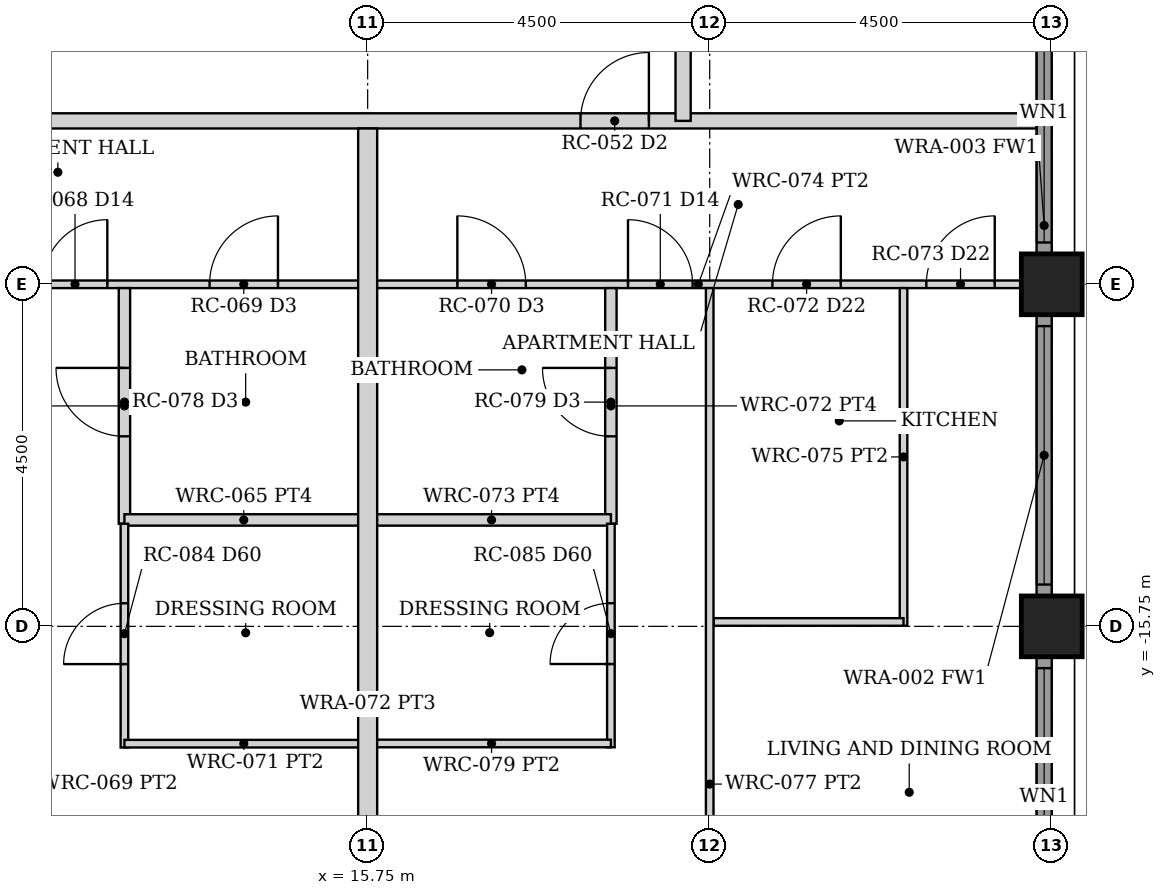
"""IFC4 building model, lengths in metres.
Left out: names, types, materials, properties, quantities, classifications, styles, units other than length and angle.
Written with IfcOpenShell. Run it as: python <this file> out.ifc"""

import sys

from ifc_helpers import new_model, si_unit, direction, frame, frame_2d, origin, origin_2d, place, context, subcontext, project, spatial, rectangle, hollow_rectangle, extrude, element, fill, save


model = new_model("IFC4")
c1 = context("Model", 3, precision=1e-05, world=origin(), true_north=direction((0.0, 1.0)))
c2 = subcontext(c1, "Body", "Model", "MODEL_VIEW")
j1 = project(units=[si_unit("LENGTHUNIT", "METRE"), si_unit("PLANEANGLEUNIT", "RADIAN")], contexts=[c1])
p1 = place(None, origin())
s1 = spatial("IfcSite", under=j1, at=p1, CompositionType="ELEMENT")
p2 = place(p1, origin())
s2 = spatial("IfcBuilding", under=s1, at=p2, CompositionType="ELEMENT")
p3 = place(p2, frame((0.0, 0.0, 47.5)))
s3 = spatial("IfcBuildingStorey", under=s2, at=p3, CompositionType="ELEMENT", Elevation=47.5)
for number, where, z_axis, x_axis in (
    (1, (24.75, -15.75, 0.0), (0.0, 0.0, 1.0), (1.0, 0.0, 0.0)),
    (2, (24.75, -11.25, 0.0), (0.0, 0.0, 1.0), (1.0, 0.0, 0.0)),
):
    element("IfcColumn", number, at=place(p3, frame(where, z_axis=z_axis, x_axis=x_axis)), inside=s3, PredefinedType="COLUMN", context=c2, shape_type="SweptSolid", body=[
        extrude(hollow_rectangle(XDim=0.8, YDim=0.8, WallThickness=0.07, at=origin_2d()), origin(), (0.0, 0.0, 1.0), 3.5),
    ])
p4 = place(p3, frame((24.65, -19.845, 0.0), z_axis=(0.0, 0.0, 1.0), x_axis=(0.0, 1.0, 0.0)))
e3 = element("IfcWall", 3, at=p4, inside=s3, PredefinedType="SOLIDWALL", context=c2, shape_type="SweptSolid", body=[
    extrude(rectangle(XDim=3.69, YDim=0.2, at=frame_2d((1.845, 0.0))), origin(), (0.0, 0.0, 1.0), 2.379),
])
p5 = place(p4, frame((0.145, 0.0, 0.3)))
e4 = element("IfcOpeningElement", 4, at=p5, cuts=e3, PredefinedType="OPENING", context=c2, shape_type="SweptSolid", body=[
    extrude(rectangle(XDim=3.4, YDim=1.929, at=frame_2d((1.7, 0.964))), frame((0.0, 0.11, 0.0), z_axis=(0.0, -1.0, 0.0), x_axis=(1.0, 0.0, 0.0)), (0.0, 0.0, 1.0), 0.22),
])
p6 = place(p3, frame((24.65, -15.345, 0.0), z_axis=(0.0, 0.0, 1.0), x_axis=(0.0, 1.0, 0.0)))
e5 = element("IfcWall", 5, at=p6, inside=s3, PredefinedType="SOLIDWALL", context=c2, shape_type="SweptSolid", body=[
    extrude(rectangle(XDim=3.69, YDim=0.2, at=frame_2d((1.845, 0.0))), origin(), (0.0, 0.0, 1.0), 2.379),
])
p7 = place(p6, frame((0.145, 0.0, 0.3)))
e6 = element("IfcOpeningElement", 6, at=p7, cuts=e5, PredefinedType="OPENING", context=c2, shape_type="SweptSolid", body=[
    extrude(rectangle(XDim=3.4, YDim=1.929, at=frame_2d((1.7, 0.964))), frame((0.0, 0.11, 0.0), z_axis=(0.0, -1.0, 0.0), x_axis=(1.0, 0.0, 0.0)), (0.0, 0.0, 1.0), 0.22),
])
p8 = place(p3, frame((24.65, -10.845, 0.0), z_axis=(0.0, 0.0, 1.0), x_axis=(0.0, 1.0, 0.0)))
e7 = element("IfcWall", 7, at=p8, inside=s3, PredefinedType="SOLIDWALL", context=c2, shape_type="SweptSolid", body=[
    extrude(rectangle(XDim=3.69, YDim=0.2, at=frame_2d((1.845, 0.0))), origin(), (0.0, 0.0, 1.0), 2.379),
])
p9 = place(p8, frame((0.145, 0.0, 0.3)))
e8 = element("IfcOpeningElement", 8, at=p9, cuts=e7, PredefinedType="OPENING", context=c2, shape_type="SweptSolid", body=[
    extrude(rectangle(XDim=3.4, YDim=1.929, at=frame_2d((1.7, 0.964))), frame((0.0, 0.11, 0.0), z_axis=(0.0, -1.0, 0.0), x_axis=(1.0, 0.0, 0.0)), (0.0, 0.0, 1.0), 0.22),
])
p10 = place(p3, frame((-24.55, -9.1, 0.0), z_axis=(0.0, 0.0, 1.0), x_axis=(1.0, 0.0, 0.0)))
e9 = element("IfcWall", 9, at=p10, inside=s3, PredefinedType="PARTITIONING", context=c2, shape_type="SweptSolid", body=[
    extrude(rectangle(XDim=49.1, YDim=0.2, at=frame_2d((24.55, 0.0))), origin(), (0.0, 0.0, 1.0), 2.373),
])
p11 = place(p10, frame((5.1, 0.0, 0.0)))
e10 = element("IfcOpeningElement", 10, at=p11, cuts=e9, PredefinedType="OPENING", context=c2, shape_type="SweptSolid", body=[
    extrude(rectangle(XDim=0.9, YDim=2.1, at=frame_2d((0.45, 1.05))), frame((0.0, 0.11, 0.0), z_axis=(0.0, -1.0, 0.0), x_axis=(1.0, 0.0, 0.0)), (0.0, 0.0, 1.0), 0.22),
])
p12 = place(p10, frame((13.6, 0.0, 0.0)))
e11 = element("IfcOpeningElement", 11, at=p12, cuts=e9, PredefinedType="OPENING", context=c2, shape_type="SweptSolid", body=[
    extrude(rectangle(XDim=0.9, YDim=2.1, at=frame_2d((0.45, 1.05))), frame((0.0, 0.11, 0.0), z_axis=(0.0, -1.0, 0.0), x_axis=(1.0, 0.0, 0.0)), (0.0, 0.0, 1.0), 0.22),
])
p13 = place(p10, frame((18.1, 0.0, 0.0)))
e12 = element("IfcOpeningElement", 12, at=p13, cuts=e9, PredefinedType="OPENING", context=c2, shape_type="SweptSolid", body=[
    extrude(rectangle(XDim=0.9, YDim=2.1, at=frame_2d((0.45, 1.05))), frame((0.0, 0.11, 0.0), z_axis=(0.0, -1.0, 0.0), x_axis=(1.0, 0.0, 0.0)), (0.0, 0.0, 1.0), 0.22),
])
p14 = place(p10, frame((31.6, 0.0, 0.0)))
e13 = element("IfcOpeningElement", 13, at=p14, cuts=e9, PredefinedType="OPENING", context=c2, shape_type="SweptSolid", body=[
    extrude(rectangle(XDim=0.9, YDim=2.1, at=frame_2d((0.45, 1.05))), frame((0.0, 0.11, 0.0), z_axis=(0.0, -1.0, 0.0), x_axis=(1.0, 0.0, 0.0)), (0.0, 0.0, 1.0), 0.22),
])
p15 = place(p10, frame((43.1, 0.0, 0.0)))
e14 = element("IfcOpeningElement", 14, at=p15, cuts=e9, PredefinedType="OPENING", context=c2, shape_type="SweptSolid", body=[
    extrude(rectangle(XDim=0.9, YDim=2.1, at=frame_2d((0.45, 1.05))), frame((0.0, 0.11, 0.0), z_axis=(0.0, -1.0, 0.0), x_axis=(1.0, 0.0, 0.0)), (0.0, 0.0, 1.0), 0.22),
])
p16 = place(p3, frame((19.9, -9.1, 0.0), z_axis=(0.0, 0.0, 1.0), x_axis=(0.0, 1.0, 0.0)))
e15 = element("IfcWall", 15, at=p16, inside=s3, PredefinedType="PARTITIONING", context=c2, shape_type="SweptSolid", body=[
    extrude(rectangle(XDim=18.2, YDim=0.2, at=frame_2d((9.1, 0.0))), origin(), (0.0, 0.0, 1.0), 2.373),
])
p17 = place(p16, frame((8.6, 0.0, 0.0)))
e16 = element("IfcOpeningElement", 16, at=p17, cuts=e15, PredefinedType="OPENING", context=c2, shape_type="SweptSolid", body=[
    extrude(rectangle(XDim=1.0, YDim=2.1, at=frame_2d((0.5, 1.05))), frame((0.0, 0.11, 0.0), z_axis=(0.0, -1.0, 0.0), x_axis=(1.0, 0.0, 0.0)), (0.0, 0.0, 1.0), 0.22),
])
p18 = place(p3, frame((6.85, -11.25, 0.0), z_axis=(0.0, 0.0, 1.0), x_axis=(1.0, 0.0, 0.0)))
e17 = element("IfcWall", 17, at=p18, inside=s3, PredefinedType="PARTITIONING", context=c2, shape_type="SweptSolid", body=[
    extrude(rectangle(XDim=8.8, YDim=0.1, at=frame_2d((4.4, 0.0))), origin(), (0.0, 0.0, 1.0), 2.373),
])
p19 = place(p18, frame((0.85, 0.0, 0.0)))
e18 = element("IfcOpeningElement", 18, at=p19, cuts=e17, PredefinedType="OPENING", context=c2, shape_type="SweptSolid", body=[
    extrude(rectangle(XDim=0.9, YDim=2.1, at=frame_2d((0.45, 1.05))), frame((0.0, 0.06, 0.0), z_axis=(0.0, -1.0, 0.0), x_axis=(1.0, 0.0, 0.0)), (0.0, 0.0, 1.0), 0.12),
])
p20 = place(p18, frame((3.1, 0.0, 0.0)))
e19 = element("IfcOpeningElement", 19, at=p20, cuts=e17, PredefinedType="OPENING", context=c2, shape_type="SweptSolid", body=[
    extrude(rectangle(XDim=0.9, YDim=2.1, at=frame_2d((0.45, 1.05))), frame((0.0, 0.06, 0.0), z_axis=(0.0, -1.0, 0.0), x_axis=(1.0, 0.0, 0.0)), (0.0, 0.0, 1.0), 0.12),
])
p21 = place(p18, frame((4.625, 0.0, 0.0)))
e20 = element("IfcOpeningElement", 20, at=p21, cuts=e17, PredefinedType="OPENING", context=c2, shape_type="SweptSolid", body=[
    extrude(rectangle(XDim=0.85, YDim=2.1, at=frame_2d((0.425, 1.05))), frame((0.0, 0.06, 0.0), z_axis=(0.0, -1.0, 0.0), x_axis=(1.0, 0.0, 0.0)), (0.0, 0.0, 1.0), 0.12),
])
p22 = place(p18, frame((6.82, 0.0, 0.0)))
e21 = element("IfcOpeningElement", 21, at=p22, cuts=e17, PredefinedType="OPENING", context=c2, shape_type="SweptSolid", body=[
    extrude(rectangle(XDim=0.9, YDim=2.1, at=frame_2d((0.45, 1.05))), frame((0.0, 0.06, 0.0), z_axis=(0.0, -1.0, 0.0), x_axis=(1.0, 0.0, 0.0)), (0.0, 0.0, 1.0), 0.12),
])
p23 = place(p3, frame((12.55, -14.4, 0.0), z_axis=(0.0, 0.0, 1.0), x_axis=(0.0, 1.0, 0.0)))
e22 = element("IfcWall", 22, at=p23, inside=s3, PredefinedType="PARTITIONING", context=c2, shape_type="SweptSolid", body=[
    extrude(rectangle(XDim=3.1, YDim=0.15, at=frame_2d((1.55, 0.0))), origin(), (0.0, 0.0, 1.0), 2.373),
])
p24 = place(p23, frame((1.15, 0.0, 0.0)))
e23 = element("IfcOpeningElement", 23, at=p24, cuts=e22, PredefinedType="OPENING", context=c2, shape_type="SweptSolid", body=[
    extrude(rectangle(XDim=0.9, YDim=2.1, at=frame_2d((0.45, 1.05))), frame((0.0, 0.085, 0.0), z_axis=(0.0, -1.0, 0.0), x_axis=(1.0, 0.0, 0.0)), (0.0, 0.0, 1.0), 0.17),
])
p25 = place(p3, frame((12.55, -14.35, 0.0), z_axis=(0.0, 0.0, 1.0), x_axis=(1.0, 0.0, 0.0)))
e24 = element("IfcWall", 24, at=p25, inside=s3, PredefinedType="PARTITIONING", context=c2, shape_type="SweptSolid", body=[
    extrude(rectangle(XDim=3.14, YDim=0.15, at=frame_2d((1.57, 0.0))), origin(), (0.0, 0.0, 1.0), 2.373),
])
p26 = place(p3, frame((12.55, -17.344, 0.0), z_axis=(0.0, 0.0, 1.0), x_axis=(0.0, 1.0, 0.0)))
e25 = element("IfcWall", 25, at=p26, inside=s3, PredefinedType="PARTITIONING", context=c2, shape_type="SweptSolid", body=[
    extrude(rectangle(XDim=2.944, YDim=0.1, at=frame_2d((1.472, 0.0))), origin(), (0.0, 0.0, 1.0), 2.373),
])
p27 = place(p26, frame((1.097, 0.0, 0.0)))
e26 = element("IfcOpeningElement", 26, at=p27, cuts=e25, PredefinedType="OPENING", context=c2, shape_type="SweptSolid", body=[
    extrude(rectangle(XDim=0.8, YDim=2.1, at=frame_2d((0.4, 1.05))), frame((0.0, 0.06, 0.0), z_axis=(0.0, -1.0, 0.0), x_axis=(1.0, 0.0, 0.0)), (0.0, 0.0, 1.0), 0.12),
])
p28 = place(p3, frame((12.55, -17.293, 0.0), z_axis=(0.0, 0.0, 1.0), x_axis=(1.0, 0.0, 0.0)))
e27 = element("IfcWall", 27, at=p28, inside=s3, PredefinedType="PARTITIONING", context=c2, shape_type="SweptSolid", body=[
    extrude(rectangle(XDim=3.14, YDim=0.1, at=frame_2d((1.57, 0.0))), origin(), (0.0, 0.0, 1.0), 2.373),
])
p29 = place(p3, frame((15.85, -11.25, 0.0), z_axis=(0.0, 0.0, 1.0), x_axis=(1.0, 0.0, 0.0)))
e28 = element("IfcWall", 28, at=p29, inside=s3, PredefinedType="PARTITIONING", context=c2, shape_type="SweptSolid", body=[
    extrude(rectangle(XDim=8.5, YDim=0.1, at=frame_2d((4.25, 0.0))), origin(), (0.0, 0.0, 1.0), 2.373),
])
p30 = place(p29, frame((5.225, 0.0, 0.0)))
e29 = element("IfcOpeningElement", 29, at=p30, cuts=e28, PredefinedType="OPENING", context=c2, shape_type="SweptSolid", body=[
    extrude(rectangle(XDim=0.9, YDim=2.1, at=frame_2d((0.45, 1.05))), frame((0.0, 0.06, 0.0), z_axis=(0.0, -1.0, 0.0), x_axis=(1.0, 0.0, 0.0)), (0.0, 0.0, 1.0), 0.12),
])
p31 = place(p29, frame((7.25, 0.0, 0.0)))
e30 = element("IfcOpeningElement", 30, at=p31, cuts=e28, PredefinedType="OPENING", context=c2, shape_type="SweptSolid", body=[
    extrude(rectangle(XDim=0.9, YDim=2.1, at=frame_2d((0.45, 1.05))), frame((0.0, 0.06, 0.0), z_axis=(0.0, -1.0, 0.0), x_axis=(1.0, 0.0, 0.0)), (0.0, 0.0, 1.0), 0.12),
])
p32 = place(p29, frame((3.325, 0.0, 0.0)))
e31 = element("IfcOpeningElement", 31, at=p32, cuts=e28, PredefinedType="OPENING", context=c2, shape_type="SweptSolid", body=[
    extrude(rectangle(XDim=0.85, YDim=2.1, at=frame_2d((0.425, 1.05))), frame((0.0, 0.06, 0.0), z_axis=(0.0, -1.0, 0.0), x_axis=(1.0, 0.0, 0.0)), (0.0, 0.0, 1.0), 0.12),
])
p33 = place(p29, frame((1.08, 0.0, 0.0)))
e32 = element("IfcOpeningElement", 32, at=p33, cuts=e28, PredefinedType="OPENING", context=c2, shape_type="SweptSolid", body=[
    extrude(rectangle(XDim=0.9, YDim=2.1, at=frame_2d((0.45, 1.05))), frame((0.0, 0.06, 0.0), z_axis=(0.0, -1.0, 0.0), x_axis=(1.0, 0.0, 0.0)), (0.0, 0.0, 1.0), 0.12),
])
p34 = place(p3, frame((22.8, -15.742, 0.0), z_axis=(0.0, 0.0, 1.0), x_axis=(0.0, 1.0, 0.0)))
e33 = element("IfcWall", 33, at=p34, inside=s3, PredefinedType="PARTITIONING", context=c2, shape_type="SweptSolid", body=[
    extrude(rectangle(XDim=4.442, YDim=0.1, at=frame_2d((2.221, 0.0))), origin(), (0.0, 0.0, 1.0), 2.373),
])
p35 = place(p3, frame((20.3, -15.692, 0.0), z_axis=(0.0, 0.0, 1.0), x_axis=(1.0, 0.0, 0.0)))
e34 = element("IfcWall", 34, at=p35, inside=s3, PredefinedType="PARTITIONING", context=c2, shape_type="SweptSolid", body=[
    extrude(rectangle(XDim=2.5, YDim=0.1, at=frame_2d((1.25, 0.0))), origin(), (0.0, 0.0, 1.0), 2.373),
])
p36 = place(p3, frame((20.25, -24.35, 0.0), z_axis=(0.0, 0.0, 1.0), x_axis=(0.0, 1.0, 0.0)))
e35 = element("IfcWall", 35, at=p36, inside=s3, PredefinedType="PARTITIONING", context=c2, shape_type="SweptSolid", body=[
    extrude(rectangle(XDim=13.05, YDim=0.1, at=frame_2d((6.525, 0.0))), origin(), (0.0, 0.0, 1.0), 2.373),
])
p37 = place(p3, frame((18.95, -14.4, 0.0), z_axis=(0.0, 0.0, 1.0), x_axis=(0.0, 1.0, 0.0)))
e36 = element("IfcWall", 36, at=p37, inside=s3, PredefinedType="PARTITIONING", context=c2, shape_type="SweptSolid", body=[
    extrude(rectangle(XDim=3.1, YDim=0.15, at=frame_2d((1.55, 0.0))), origin(), (0.0, 0.0, 1.0), 2.373),
])
p38 = place(p37, frame((1.15, 0.0, 0.0)))
e37 = element("IfcOpeningElement", 37, at=p38, cuts=e36, PredefinedType="OPENING", context=c2, shape_type="SweptSolid", body=[
    extrude(rectangle(XDim=0.9, YDim=2.1, at=frame_2d((0.45, 1.05))), frame((0.0, 0.085, 0.0), z_axis=(0.0, -1.0, 0.0), x_axis=(1.0, 0.0, 0.0)), (0.0, 0.0, 1.0), 0.17),
])
p39 = place(p3, frame((15.81, -14.35, 0.0), z_axis=(0.0, 0.0, 1.0), x_axis=(1.0, 0.0, 0.0)))
e38 = element("IfcWall", 38, at=p39, inside=s3, PredefinedType="PARTITIONING", context=c2, shape_type="SweptSolid", body=[
    extrude(rectangle(XDim=3.14, YDim=0.15, at=frame_2d((1.57, 0.0))), origin(), (0.0, 0.0, 1.0), 2.373),
])
p40 = place(p3, frame((18.95, -17.341, 0.0), z_axis=(0.0, 0.0, 1.0), x_axis=(0.0, 1.0, 0.0)))
e39 = element("IfcWall", 39, at=p40, inside=s3, PredefinedType="PARTITIONING", context=c2, shape_type="SweptSolid", body=[
    extrude(rectangle(XDim=2.941, YDim=0.1, at=frame_2d((1.47, 0.0))), origin(), (0.0, 0.0, 1.0), 2.373),
])
p41 = place(p40, frame((1.095, 0.0, 0.0)))
e40 = element("IfcOpeningElement", 40, at=p41, cuts=e39, PredefinedType="OPENING", context=c2, shape_type="SweptSolid", body=[
    extrude(rectangle(XDim=0.8, YDim=2.1, at=frame_2d((0.4, 1.05))), frame((0.0, 0.06, 0.0), z_axis=(0.0, -1.0, 0.0), x_axis=(1.0, 0.0, 0.0)), (0.0, 0.0, 1.0), 0.12),
])
p42 = place(p3, frame((15.81, -17.291, 0.0), z_axis=(0.0, 0.0, 1.0), x_axis=(1.0, 0.0, 0.0)))
e41 = element("IfcWall", 41, at=p42, inside=s3, PredefinedType="PARTITIONING", context=c2, shape_type="SweptSolid", body=[
    extrude(rectangle(XDim=3.14, YDim=0.1, at=frame_2d((1.57, 0.0))), origin(), (0.0, 0.0, 1.0), 2.373),
])
p43 = place(p3, frame((15.75, -24.35, 0.0), z_axis=(0.0, 0.0, 1.0), x_axis=(0.0, 1.0, 0.0)))
e42 = element("IfcWall", 42, at=p43, inside=s3, PredefinedType="PARTITIONING", context=c2, shape_type="SweptSolid", body=[
    extrude(rectangle(XDim=15.15, YDim=0.25, at=frame_2d((7.575, 0.0))), origin(), (0.0, 0.0, 1.0), 2.373),
])
p44 = place(p5, origin())
e43 = element("IfcWindow", 43, at=p44, inside=s3, PartitioningType="SINGLE_PANEL", PredefinedType="WINDOW", context=c2, shape_type="SweptSolid", body=[
    extrude(rectangle(XDim=3.4, YDim=1.929, at=frame_2d((1.7, 0.964))), frame((0.0, 0.03, 0.0), z_axis=(0.0, -1.0, 0.0), x_axis=(1.0, 0.0, 0.0)), (0.0, 0.0, 1.0), 0.06),
])
fill(e4, e43)
p45 = place(p7, origin())
e44 = element("IfcWindow", 44, at=p45, inside=s3, PartitioningType="SINGLE_PANEL", PredefinedType="WINDOW", context=c2, shape_type="SweptSolid", body=[
    extrude(rectangle(XDim=3.4, YDim=1.929, at=frame_2d((1.7, 0.964))), frame((0.0, 0.03, 0.0), z_axis=(0.0, -1.0, 0.0), x_axis=(1.0, 0.0, 0.0)), (0.0, 0.0, 1.0), 0.06),
])
fill(e6, e44)
p46 = place(p9, origin())
e45 = element("IfcWindow", 45, at=p46, inside=s3, PartitioningType="SINGLE_PANEL", PredefinedType="WINDOW", context=c2, shape_type="SweptSolid", body=[
    extrude(rectangle(XDim=3.4, YDim=1.929, at=frame_2d((1.7, 0.964))), frame((0.0, 0.03, 0.0), z_axis=(0.0, -1.0, 0.0), x_axis=(1.0, 0.0, 0.0)), (0.0, 0.0, 1.0), 0.06),
])
fill(e8, e45)
p47 = place(p21, origin())
e46 = element("IfcDoor", 46, at=p47, inside=s3, OperationType="SINGLE_SWING_RIGHT", PredefinedType="DOOR", context=c2, shape_type="SweptSolid", body=[
    extrude(rectangle(XDim=0.85, YDim=2.1, at=frame_2d((0.425, 1.05))), frame((0.0, 0.025, 0.0), z_axis=(0.0, -1.0, 0.0), x_axis=(1.0, 0.0, 0.0)), (0.0, 0.0, 1.0), 0.05),
])
fill(e20, e46)
p48 = place(p24, origin())
e47 = element("IfcDoor", 47, at=p48, inside=s3, OperationType="SINGLE_SWING_RIGHT", PredefinedType="DOOR", context=c2, shape_type="SweptSolid", body=[
    extrude(rectangle(XDim=0.9, YDim=2.1, at=frame_2d((0.45, 1.05))), frame((0.0, 0.025, 0.0), z_axis=(0.0, -1.0, 0.0), x_axis=(1.0, 0.0, 0.0)), (0.0, 0.0, 1.0), 0.05),
])
fill(e23, e47)
p49 = place(p22, origin())
e48 = element("IfcDoor", 48, at=p49, inside=s3, OperationType="SINGLE_SWING_RIGHT", PredefinedType="DOOR", context=c2, shape_type="SweptSolid", body=[
    extrude(rectangle(XDim=0.9, YDim=2.1, at=frame_2d((0.45, 1.05))), frame((0.0, 0.025, 0.0), z_axis=(0.0, -1.0, 0.0), x_axis=(1.0, 0.0, 0.0)), (0.0, 0.0, 1.0), 0.05),
])
fill(e21, e48)
p50 = place(p27, origin())
e49 = element("IfcDoor", 49, at=p50, inside=s3, OperationType="SINGLE_SWING_LEFT", PredefinedType="DOOR", context=c2, shape_type="SweptSolid", body=[
    extrude(rectangle(XDim=0.8, YDim=2.1, at=frame_2d((0.4, 1.05))), frame((0.0, 0.025, 0.0), z_axis=(0.0, -1.0, 0.0), x_axis=(1.0, 0.0, 0.0)), (0.0, 0.0, 1.0), 0.05),
])
fill(e26, e49)
p51 = place(p15, origin())
e50 = element("IfcDoor", 50, at=p51, inside=s3, OperationType="SINGLE_SWING_RIGHT", PredefinedType="DOOR", context=c2, shape_type="SweptSolid", body=[
    extrude(rectangle(XDim=0.9, YDim=2.1, at=frame_2d((0.45, 1.05))), frame((0.0, 0.025, 0.0), z_axis=(0.0, -1.0, 0.0), x_axis=(1.0, 0.0, 0.0)), (0.0, 0.0, 1.0), 0.05),
])
fill(e14, e50)
p52 = place(p30, origin())
e51 = element("IfcDoor", 51, at=p52, inside=s3, OperationType="SINGLE_SWING_RIGHT", PredefinedType="DOOR", context=c2, shape_type="SweptSolid", body=[
    extrude(rectangle(XDim=0.9, YDim=2.1, at=frame_2d((0.45, 1.05))), frame((0.0, 0.025, 0.0), z_axis=(0.0, -1.0, 0.0), x_axis=(1.0, 0.0, 0.0)), (0.0, 0.0, 1.0), 0.05),
])
fill(e29, e51)
p53 = place(p31, origin())
e52 = element("IfcDoor", 52, at=p53, inside=s3, OperationType="SINGLE_SWING_RIGHT", PredefinedType="DOOR", context=c2, shape_type="SweptSolid", body=[
    extrude(rectangle(XDim=0.9, YDim=2.1, at=frame_2d((0.45, 1.05))), frame((0.0, 0.025, 0.0), z_axis=(0.0, -1.0, 0.0), x_axis=(1.0, 0.0, 0.0)), (0.0, 0.0, 1.0), 0.05),
])
fill(e30, e52)
p54 = place(p32, origin())
e53 = element("IfcDoor", 53, at=p54, inside=s3, OperationType="SINGLE_SWING_LEFT", PredefinedType="DOOR", context=c2, shape_type="SweptSolid", body=[
    extrude(rectangle(XDim=0.85, YDim=2.1, at=frame_2d((0.425, 1.05))), frame((0.0, 0.025, 0.0), z_axis=(0.0, -1.0, 0.0), x_axis=(1.0, 0.0, 0.0)), (0.0, 0.0, 1.0), 0.05),
])
fill(e31, e53)
p55 = place(p38, origin())
e54 = element("IfcDoor", 54, at=p55, inside=s3, OperationType="SINGLE_SWING_RIGHT", PredefinedType="DOOR", context=c2, shape_type="SweptSolid", body=[
    extrude(rectangle(XDim=0.9, YDim=2.1, at=frame_2d((0.45, 1.05))), frame((0.0, 0.025, 0.0), z_axis=(0.0, -1.0, 0.0), x_axis=(1.0, 0.0, 0.0)), (0.0, 0.0, 1.0), 0.05),
])
fill(e37, e54)
p56 = place(p33, origin())
e55 = element("IfcDoor", 55, at=p56, inside=s3, OperationType="SINGLE_SWING_LEFT", PredefinedType="DOOR", context=c2, shape_type="SweptSolid", body=[
    extrude(rectangle(XDim=0.9, YDim=2.1, at=frame_2d((0.45, 1.05))), frame((0.0, 0.025, 0.0), z_axis=(0.0, -1.0, 0.0), x_axis=(1.0, 0.0, 0.0)), (0.0, 0.0, 1.0), 0.05),
])
fill(e32, e55)
p57 = place(p41, origin())
e56 = element("IfcDoor", 56, at=p57, inside=s3, OperationType="SINGLE_SWING_LEFT", PredefinedType="DOOR", context=c2, shape_type="SweptSolid", body=[
    extrude(rectangle(XDim=0.8, YDim=2.1, at=frame_2d((0.4, 1.05))), frame((0.0, 0.025, 0.0), z_axis=(0.0, -1.0, 0.0), x_axis=(1.0, 0.0, 0.0)), (0.0, 0.0, 1.0), 0.05),
])
fill(e40, e56)
save(model, sys.argv[1])
